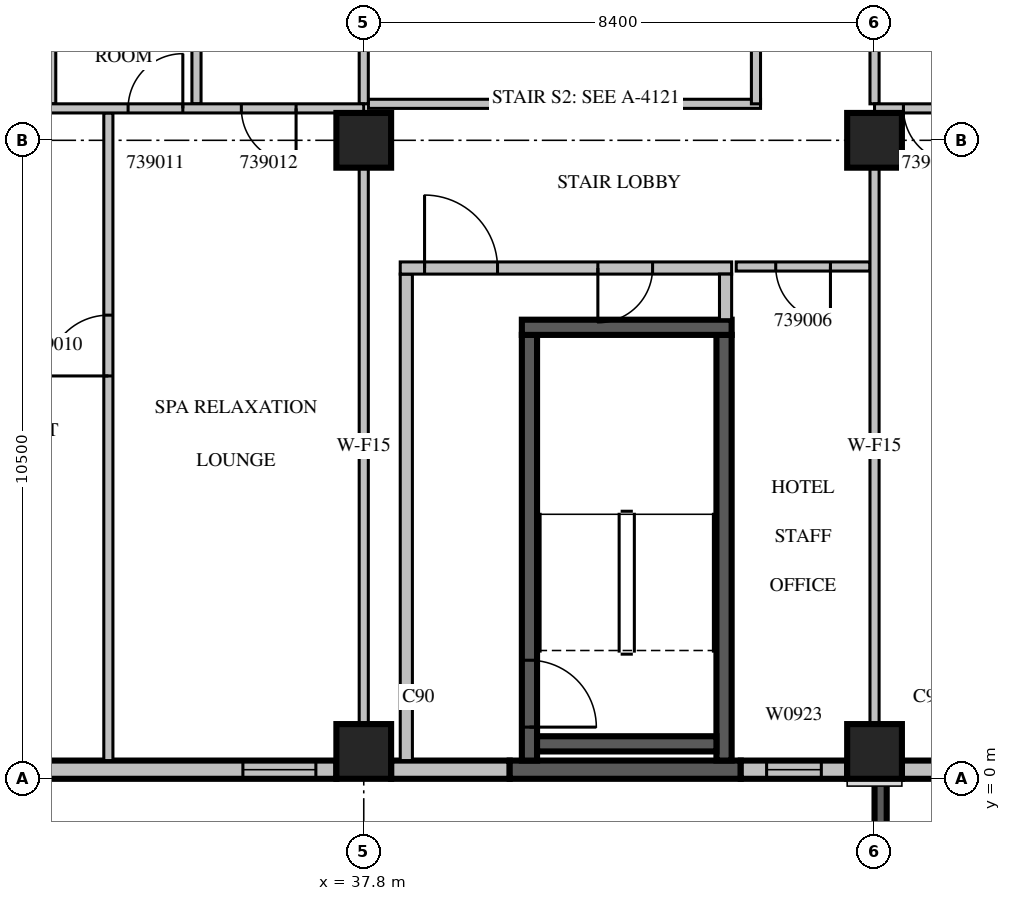
"""IFC4 building model, lengths in metres.
Left out: names, types, materials, properties, quantities, classifications, styles, units other than length and angle.
Written with IfcOpenShell. Run it as: python <this file> out.ifc"""

import sys

from ifc_helpers import new_model, si_unit, direction, frame, frame_2d, origin, origin_2d, place, context, subcontext, project, spatial, rectangle, extrude, source, transform, mapped, element, fill, save


model = new_model("IFC4")
c1 = context("Model", 3, precision=1e-05, world=origin(), true_north=direction((0.0, 1.0)))
c2 = subcontext(c1, "Body", "Model", "MODEL_VIEW")
j1 = project(units=[si_unit("LENGTHUNIT", "METRE"), si_unit("PLANEANGLEUNIT", "RADIAN")], contexts=[c1])
p1 = place(None, origin())
s1 = spatial("IfcSite", under=j1, at=p1, CompositionType="ELEMENT")
p2 = place(p1, origin())
s2 = spatial("IfcBuilding", under=s1, at=p2, CompositionType="ELEMENT")
p3 = place(p2, frame((0.0, 0.0, 181.6)))
s3 = spatial("IfcBuildingStorey", under=s2, at=p3, CompositionType="ELEMENT", Elevation=181.6)
m1 = source(origin(), c2, "Body", "SweptSolid", [
    extrude(rectangle(XDim=0.9, YDim=0.9, at=origin_2d()), origin(), (0.0, 0.0, 1.0), 3.8),
])
for number, where, z_axis, x_axis in (
    (1, (37.8, 0.45, 0.0), (0.0, 0.0, 1.0), (1.0, 0.0, 0.0)),
    (2, (46.2, 0.45, 0.0), (0.0, 0.0, 1.0), (1.0, 0.0, 0.0)),
    (3, (37.8, 10.5, 0.0), (0.0, 0.0, 1.0), (1.0, 0.0, 0.0)),
    (4, (46.2, 10.5, 0.0), (0.0, 0.0, 1.0), (1.0, 0.0, 0.0)),
):
    element("IfcColumn", number, at=place(p3, frame(where, z_axis=z_axis, x_axis=x_axis)), inside=s3, PredefinedType="COLUMN", context=c2, shape_type="MappedRepresentation", body=[
        mapped(m1, transform((0.0, 0.0, 0.0), scale=1.0)),
    ])
p4 = place(p3, frame((46.3, 0.0, 0.0), z_axis=(0.0, 0.0, 1.0), x_axis=(0.0, -1.0, 0.0)))
e5 = element("IfcWall", 5, at=p4, inside=s3, PredefinedType="SOLIDWALL", context=c2, shape_type="SweptSolid", body=[
    extrude(rectangle(XDim=3.9, YDim=0.2, at=frame_2d((1.95, 0.0))), origin(), (0.0, 0.0, 1.0), 3.4),
])
m2 = source(origin(), c2, "Body", "SweptSolid", [
    extrude(rectangle(XDim=2.4, YDim=2.3, at=frame_2d((1.2, 1.15))), frame((0.0, 0.11, 0.0), z_axis=(0.0, -1.0, 0.0), x_axis=(1.0, 0.0, 0.0)), (0.0, 0.0, 1.0), 0.22),
])
p5 = place(p4, frame((0.75, 0.0, 0.6)))
e6 = element("IfcOpeningElement", 6, at=p5, cuts=e5, PredefinedType="OPENING", context=c2, shape_type="MappedRepresentation", body=[
    mapped(m2, transform((0.0, 0.0, 0.0), scale=1.0)),
])
m3 = source(origin(), c2, "Body", "SweptSolid", [
    extrude(rectangle(XDim=7.5, YDim=0.3, at=frame_2d((3.75, 0.0))), origin(), (0.0, 0.0, 1.0), 3.4),
])
p6 = place(p3, frame((29.85, 0.15, 0.0), z_axis=(0.0, 0.0, 1.0), x_axis=(1.0, 0.0, 0.0)))
e7 = element("IfcWall", 7, at=p6, inside=s3, PredefinedType="STANDARD", context=c2, shape_type="MappedRepresentation", body=[
    mapped(m3, transform((0.0, 0.0, 0.0), scale=1.0)),
])
m4 = source(origin(), c2, "Body", "SweptSolid", [
    extrude(rectangle(XDim=1.2, YDim=2.3, at=frame_2d((0.6, 1.15))), frame((0.0, 0.16, 0.0), z_axis=(0.0, -1.0, 0.0), x_axis=(1.0, 0.0, 0.0)), (0.0, 0.0, 1.0), 0.32),
])
p7 = place(p6, frame((0.438, 0.0, 0.6)))
e8 = element("IfcOpeningElement", 8, at=p7, cuts=e7, PredefinedType="OPENING", context=c2, shape_type="MappedRepresentation", body=[
    mapped(m4, transform((0.0, 0.0, 0.0), scale=1.0)),
])
p8 = place(p6, frame((5.963, 0.0, 0.6)))
e9 = element("IfcOpeningElement", 9, at=p8, cuts=e7, PredefinedType="OPENING", context=c2, shape_type="MappedRepresentation", body=[
    mapped(m4, transform((0.0, 0.0, 0.0), scale=1.0)),
])
m5 = source(origin(), c2, "Body", "SweptSolid", [
    extrude(rectangle(XDim=1.95, YDim=0.3, at=frame_2d((0.975, 0.0))), origin(), (0.0, 0.0, 1.0), 3.4),
])
p9 = place(p3, frame((38.25, 0.15, 0.0), z_axis=(0.0, 0.0, 1.0), x_axis=(1.0, 0.0, 0.0)))
e10 = element("IfcWall", 10, at=p9, inside=s3, PredefinedType="STANDARD", context=c2, shape_type="MappedRepresentation", body=[
    mapped(m5, transform((0.0, 0.0, 0.0), scale=1.0)),
])
m6 = source(origin(), c2, "Body", "SweptSolid", [
    extrude(rectangle(XDim=3.8, YDim=0.3, at=frame_2d((1.9, 0.0))), origin(), (0.0, 0.0, 1.0), 3.4),
])
p10 = place(p3, frame((40.2, 0.15, 0.0), z_axis=(0.0, 0.0, 1.0), x_axis=(1.0, 0.0, 0.0)))
e11 = element("IfcWall", 11, at=p10, inside=s3, PredefinedType="SOLIDWALL", context=c2, shape_type="MappedRepresentation", body=[
    mapped(m6, transform((0.0, 0.0, 0.0), scale=1.0)),
])
m7 = source(origin(), c2, "Body", "SweptSolid", [
    extrude(rectangle(XDim=1.75, YDim=0.3, at=frame_2d((0.875, 0.0))), origin(), (0.0, 0.0, 1.0), 3.4),
])
p11 = place(p3, frame((44.0, 0.15, 0.0), z_axis=(0.0, 0.0, 1.0), x_axis=(1.0, 0.0, 0.0)))
e12 = element("IfcWall", 12, at=p11, inside=s3, PredefinedType="STANDARD", context=c2, shape_type="MappedRepresentation", body=[
    mapped(m7, transform((0.0, 0.0, 0.0), scale=1.0)),
])
m8 = source(origin(), c2, "Body", "SweptSolid", [
    extrude(rectangle(XDim=0.9, YDim=2.3, at=frame_2d((0.45, 1.15))), frame((0.0, 0.16, 0.0), z_axis=(0.0, -1.0, 0.0), x_axis=(1.0, 0.0, 0.0)), (0.0, 0.0, 1.0), 0.32),
])
p12 = place(p11, frame((0.425, 0.0, 0.6)))
e13 = element("IfcOpeningElement", 13, at=p12, cuts=e12, PredefinedType="OPENING", context=c2, shape_type="MappedRepresentation", body=[
    mapped(m8, transform((0.0, 0.0, 0.0), scale=1.0)),
])
m9 = source(origin(), c2, "Body", "SweptSolid", [
    extrude(rectangle(XDim=4.98, YDim=0.3, at=frame_2d((2.49, 0.0))), origin(), (0.0, 0.0, 1.0), 3.4),
])
p13 = place(p3, frame((46.65, 0.15, 0.0), z_axis=(0.0, 0.0, 1.0), x_axis=(1.0, 0.0, 0.0)))
e14 = element("IfcWall", 14, at=p13, inside=s3, PredefinedType="STANDARD", context=c2, shape_type="MappedRepresentation", body=[
    mapped(m9, transform((0.0, 0.0, 0.0), scale=1.0)),
])
m10 = source(origin(), c2, "Body", "SweptSolid", [
    extrude(rectangle(XDim=1.0, YDim=2.1, at=frame_2d((0.5, 1.05))), frame((0.0, 0.16, 0.0), z_axis=(0.0, -1.0, 0.0), x_axis=(1.0, 0.0, 0.0)), (0.0, 0.0, 1.0), 0.32),
])
p14 = place(p13, frame((1.99, 0.0, 0.0)))
e15 = element("IfcOpeningElement", 15, at=p14, cuts=e14, PredefinedType="OPENING", context=c2, shape_type="MappedRepresentation", body=[
    mapped(m10, transform((0.0, 0.0, 0.0), scale=1.0)),
])
m11 = source(origin(), c2, "Body", "SweptSolid", [
    extrude(rectangle(XDim=7.0, YDim=0.25, at=frame_2d((3.5, 0.0))), origin(), (0.0, 0.0, 1.0), 3.4),
])
p15 = place(p3, frame((40.525, 0.3, 0.0), z_axis=(0.0, 0.0, 1.0), x_axis=(0.0, 1.0, 0.0)))
e16 = element("IfcWall", 16, at=p15, inside=s3, PredefinedType="SOLIDWALL", context=c2, shape_type="MappedRepresentation", body=[
    mapped(m11, transform((0.0, 0.0, 0.0), scale=1.0)),
])
m12 = source(origin(), c2, "Body", "SweptSolid", [
    extrude(rectangle(XDim=1.1, YDim=2.1, at=frame_2d((0.55, 1.05))), frame((0.0, 0.135, 0.0), z_axis=(0.0, -1.0, 0.0), x_axis=(1.0, 0.0, 0.0)), (0.0, 0.0, 1.0), 0.27),
])
p16 = place(p15, frame((0.55, 0.0, 0.0)))
e17 = element("IfcOpeningElement", 17, at=p16, cuts=e16, PredefinedType="OPENING", context=c2, shape_type="MappedRepresentation", body=[
    mapped(m12, transform((0.0, 0.0, 0.0), scale=1.0)),
])
p17 = place(p3, frame((43.725, 0.3, 0.0), z_axis=(0.0, 0.0, 1.0), x_axis=(0.0, 1.0, 0.0)))
e18 = element("IfcWall", 18, at=p17, inside=s3, PredefinedType="SOLIDWALL", context=c2, shape_type="MappedRepresentation", body=[
    mapped(m11, transform((0.0, 0.0, 0.0), scale=1.0)),
])
m13 = source(origin(), c2, "Body", "SweptSolid", [
    extrude(rectangle(XDim=3.45, YDim=0.25, at=frame_2d((1.725, 0.0))), origin(), (0.0, 0.0, 1.0), 3.4),
])
p18 = place(p3, frame((40.4, 7.425, 0.0), z_axis=(0.0, 0.0, 1.0), x_axis=(1.0, 0.0, 0.0)))
e19 = element("IfcWall", 19, at=p18, inside=s3, PredefinedType="SOLIDWALL", context=c2, shape_type="MappedRepresentation", body=[
    mapped(m13, transform((0.0, 0.0, 0.0), scale=1.0)),
])
m14 = source(origin(), c2, "Body", "SweptSolid", [
    extrude(rectangle(XDim=2.95, YDim=0.25, at=frame_2d((1.475, 0.0))), origin(), (0.0, 0.0, 1.0), 3.4),
])
p19 = place(p3, frame((40.65, 0.575, 0.0), z_axis=(0.0, 0.0, 1.0), x_axis=(1.0, 0.0, 0.0)))
e20 = element("IfcWall", 20, at=p19, inside=s3, PredefinedType="SOLIDWALL", context=c2, shape_type="MappedRepresentation", body=[
    mapped(m14, transform((0.0, 0.0, 0.0), scale=1.0)),
])
m15 = source(origin(), c2, "Body", "SweptSolid", [
    extrude(rectangle(XDim=8.0, YDim=0.2, at=frame_2d((4.0, 0.0))), origin(), (0.0, 0.0, 1.0), 3.4),
])
p20 = place(p3, frame((38.5, 0.3, 0.0), z_axis=(0.0, 0.0, 1.0), x_axis=(0.0, 1.0, 0.0)))
e21 = element("IfcWall", 21, at=p20, inside=s3, PredefinedType="PARTITIONING", context=c2, shape_type="MappedRepresentation", body=[
    mapped(m15, transform((0.0, 0.0, 0.0), scale=1.0)),
])
m16 = source(origin(), c2, "Body", "SweptSolid", [
    extrude(rectangle(XDim=5.45, YDim=0.2, at=frame_2d((2.725, 0.0))), origin(), (0.0, 0.0, 1.0), 3.4),
])
p21 = place(p3, frame((38.4, 8.4, 0.0), z_axis=(0.0, 0.0, 1.0), x_axis=(1.0, 0.0, 0.0)))
e22 = element("IfcWall", 22, at=p21, inside=s3, PredefinedType="PARTITIONING", context=c2, shape_type="MappedRepresentation", body=[
    mapped(m16, transform((0.0, 0.0, 0.0), scale=1.0)),
])
m17 = source(origin(), c2, "Body", "SweptSolid", [
    extrude(rectangle(XDim=1.2, YDim=2.1, at=frame_2d((0.6, 1.05))), frame((0.0, 0.11, 0.0), z_axis=(0.0, -1.0, 0.0), x_axis=(1.0, 0.0, 0.0)), (0.0, 0.0, 1.0), 0.22),
])
p22 = place(p21, frame((0.4, 0.0, 0.0)))
e23 = element("IfcOpeningElement", 23, at=p22, cuts=e22, PredefinedType="OPENING", context=c2, shape_type="MappedRepresentation", body=[
    mapped(m17, transform((0.0, 0.0, 0.0), scale=1.0)),
])
m18 = source(origin(), c2, "Body", "SweptSolid", [
    extrude(rectangle(XDim=0.9, YDim=2.1, at=frame_2d((0.45, 1.05))), frame((0.0, 0.11, 0.0), z_axis=(0.0, -1.0, 0.0), x_axis=(1.0, 0.0, 0.0)), (0.0, 0.0, 1.0), 0.22),
])
p23 = place(p21, frame((3.25, 0.0, 0.0)))
e24 = element("IfcOpeningElement", 24, at=p23, cuts=e22, PredefinedType="OPENING", context=c2, shape_type="MappedRepresentation", body=[
    mapped(m18, transform((0.0, 0.0, 0.0), scale=1.0)),
])
m19 = source(origin(), c2, "Body", "SweptSolid", [
    extrude(rectangle(XDim=0.75, YDim=0.2, at=frame_2d((0.375, 0.0))), origin(), (0.0, 0.0, 1.0), 3.4),
])
p24 = place(p3, frame((43.75, 7.55, 0.0), z_axis=(0.0, 0.0, 1.0), x_axis=(0.0, 1.0, 0.0)))
e25 = element("IfcWall", 25, at=p24, inside=s3, PredefinedType="PARTITIONING", context=c2, shape_type="MappedRepresentation", body=[
    mapped(m19, transform((0.0, 0.0, 0.0), scale=1.0)),
])
m20 = source(origin(), c2, "Body", "SweptSolid", [
    extrude(rectangle(XDim=6.45, YDim=0.15, at=frame_2d((3.225, 0.0))), origin(), (0.0, 0.0, 1.0), 3.4),
])
p25 = place(p3, frame((37.875, 11.1, 0.0), z_axis=(0.0, 0.0, 1.0), x_axis=(1.0, 0.0, 0.0)))
e26 = element("IfcWall", 26, at=p25, inside=s3, PredefinedType="PARTITIONING", context=c2, shape_type="MappedRepresentation", body=[
    mapped(m20, transform((0.0, 0.0, 0.0), scale=1.0)),
])
m21 = source(origin(), c2, "Body", "SweptSolid", [
    extrude(rectangle(XDim=3.975, YDim=0.15, at=frame_2d((1.988, 0.0))), origin(), (0.0, 0.0, 1.0), 3.4),
])
p26 = place(p3, frame((44.25, 11.1, 0.0), z_axis=(0.0, 0.0, 1.0), x_axis=(0.0, 1.0, 0.0)))
e27 = element("IfcWall", 27, at=p26, inside=s3, PredefinedType="PARTITIONING", context=c2, shape_type="MappedRepresentation", body=[
    mapped(m21, transform((0.0, 0.0, 0.0), scale=1.0)),
])
m22 = source(origin(), c2, "Body", "SweptSolid", [
    extrude(rectangle(XDim=2.2, YDim=0.15, at=frame_2d((1.1, 0.0))), origin(), (0.0, 0.0, 1.0), 3.4),
])
p27 = place(p3, frame((46.125, 8.425, 0.0), z_axis=(0.0, 0.0, 1.0), x_axis=(-1.0, 0.0, 0.0)))
e28 = element("IfcWall", 28, at=p27, inside=s3, PredefinedType="PARTITIONING", context=c2, shape_type="MappedRepresentation", body=[
    mapped(m22, transform((0.0, 0.0, 0.0), scale=1.0)),
])
m23 = source(origin(), c2, "Body", "SweptSolid", [
    extrude(rectangle(XDim=0.9, YDim=2.1, at=frame_2d((0.45, 1.05))), frame((0.0, 0.085, 0.0), z_axis=(0.0, -1.0, 0.0), x_axis=(1.0, 0.0, 0.0)), (0.0, 0.0, 1.0), 0.17),
])
p28 = place(p27, frame((0.65, 0.0, 0.0)))
e29 = element("IfcOpeningElement", 29, at=p28, cuts=e28, PredefinedType="OPENING", context=c2, shape_type="MappedRepresentation", body=[
    mapped(m23, transform((0.0, 0.0, 0.0), scale=1.0)),
])
m24 = source(origin(), c2, "Body", "SweptSolid", [
    extrude(rectangle(XDim=10.65, YDim=0.15, at=frame_2d((5.325, 0.0))), origin(), (0.0, 0.0, 1.0), 3.4),
])
p29 = place(p3, frame((33.6, 0.3, 0.0), z_axis=(0.0, 0.0, 1.0), x_axis=(0.0, 1.0, 0.0)))
e30 = element("IfcWall", 30, at=p29, inside=s3, PredefinedType="PARTITIONING", context=c2, shape_type="MappedRepresentation", body=[
    mapped(m24, transform((0.0, 0.0, 0.0), scale=1.0)),
])
m25 = source(origin(), c2, "Body", "SweptSolid", [
    extrude(rectangle(XDim=1.0, YDim=2.1, at=frame_2d((0.5, 1.05))), frame((0.0, 0.085, 0.0), z_axis=(0.0, -1.0, 0.0), x_axis=(1.0, 0.0, 0.0)), (0.0, 0.0, 1.0), 0.17),
])
p30 = place(p29, frame((6.325, 0.0, 0.0)))
e31 = element("IfcOpeningElement", 31, at=p30, cuts=e30, PredefinedType="OPENING", context=c2, shape_type="MappedRepresentation", body=[
    mapped(m25, transform((0.0, 0.0, 0.0), scale=1.0)),
])
m26 = source(origin(), c2, "Body", "SweptSolid", [
    extrude(rectangle(XDim=3.9, YDim=0.15, at=frame_2d((1.95, 0.0))), origin(), (0.0, 0.0, 1.0), 3.4),
])
for number, where, z_axis, x_axis in (
    (32, (32.66, 11.1, 0.0), (0.0, 0.0, 1.0), (0.0, 1.0, 0.0)),
    (33, (35.049, 11.1, 0.0), (0.0, 0.0, 1.0), (0.0, 1.0, 0.0)),
):
    element("IfcWall", number, at=place(p3, frame(where, z_axis=z_axis, x_axis=x_axis)), inside=s3, PredefinedType="PARTITIONING", context=c2, shape_type="MappedRepresentation", body=[
        mapped(m26, transform((0.0, 0.0, 0.0), scale=1.0)),
    ])
m27 = source(origin(), c2, "Body", "SweptSolid", [
    extrude(rectangle(XDim=9.152, YDim=0.15, at=frame_2d((4.576, 0.0))), origin(), (0.0, 0.0, 1.0), 3.4),
])
p31 = place(p3, frame((37.8, 0.899, 0.0), z_axis=(0.0, 0.0, 1.0), x_axis=(0.0, 1.0, 0.0)))
e34 = element("IfcWall", 34, at=p31, inside=s3, PredefinedType="PARTITIONING", context=c2, shape_type="MappedRepresentation", body=[
    mapped(m27, transform((0.0, 0.0, 0.0), scale=1.0)),
])
p32 = place(p3, frame((37.8, 11.1, 0.0), z_axis=(0.0, 0.0, 1.0), x_axis=(0.0, 1.0, 0.0)))
e35 = element("IfcWall", 35, at=p32, inside=s3, PredefinedType="PARTITIONING", context=c2, shape_type="MappedRepresentation", body=[
    mapped(m26, transform((0.0, 0.0, 0.0), scale=1.0)),
])
m28 = source(origin(), c2, "Body", "SweptSolid", [
    extrude(rectangle(XDim=8.4, YDim=0.15, at=frame_2d((4.2, 0.0))), origin(), (0.0, 0.0, 1.0), 3.4),
])
p33 = place(p3, frame((37.8, 11.025, 0.0), z_axis=(0.0, 0.0, 1.0), x_axis=(-1.0, 0.0, 0.0)))
e36 = element("IfcWall", 36, at=p33, inside=s3, PredefinedType="PARTITIONING", context=c2, shape_type="MappedRepresentation", body=[
    mapped(m28, transform((0.0, 0.0, 0.0), scale=1.0)),
])
p34 = place(p33, frame((6.082, 0.0, 0.0)))
e37 = element("IfcOpeningElement", 37, at=p34, cuts=e36, PredefinedType="OPENING", context=c2, shape_type="MappedRepresentation", body=[
    mapped(m23, transform((0.0, 0.0, 0.0), scale=1.0)),
])
p35 = place(p33, frame((7.04, 0.0, 0.0)))
e38 = element("IfcOpeningElement", 38, at=p35, cuts=e36, PredefinedType="OPENING", context=c2, shape_type="MappedRepresentation", body=[
    mapped(m23, transform((0.0, 0.0, 0.0), scale=1.0)),
])
p36 = place(p33, frame((2.975, 0.0, 0.0)))
e39 = element("IfcOpeningElement", 39, at=p36, cuts=e36, PredefinedType="OPENING", context=c2, shape_type="MappedRepresentation", body=[
    mapped(m23, transform((0.0, 0.0, 0.0), scale=1.0)),
])
p37 = place(p33, frame((1.113, 0.0, 0.0)))
e40 = element("IfcOpeningElement", 40, at=p37, cuts=e36, PredefinedType="OPENING", context=c2, shape_type="MappedRepresentation", body=[
    mapped(m23, transform((0.0, 0.0, 0.0), scale=1.0)),
])
p38 = place(p3, frame((46.2, 0.899, 0.0), z_axis=(0.0, 0.0, 1.0), x_axis=(0.0, 1.0, 0.0)))
e41 = element("IfcWall", 41, at=p38, inside=s3, PredefinedType="PARTITIONING", context=c2, shape_type="MappedRepresentation", body=[
    mapped(m27, transform((0.0, 0.0, 0.0), scale=1.0)),
])
p39 = place(p3, frame((46.2, 11.1, 0.0), z_axis=(0.0, 0.0, 1.0), x_axis=(0.0, 1.0, 0.0)))
e42 = element("IfcWall", 42, at=p39, inside=s3, PredefinedType="PARTITIONING", context=c2, shape_type="MappedRepresentation", body=[
    mapped(m26, transform((0.0, 0.0, 0.0), scale=1.0)),
])
m29 = source(origin(), c2, "Body", "SweptSolid", [
    extrude(rectangle(XDim=13.14, YDim=0.15, at=frame_2d((6.57, 0.0))), origin(), (0.0, 0.0, 1.0), 3.4),
])
p40 = place(p3, frame((59.34, 11.025, 0.0), z_axis=(0.0, 0.0, 1.0), x_axis=(-1.0, 0.0, 0.0)))
e43 = element("IfcWall", 43, at=p40, inside=s3, PredefinedType="PARTITIONING", context=c2, shape_type="MappedRepresentation", body=[
    mapped(m29, transform((0.0, 0.0, 0.0), scale=1.0)),
])
p41 = place(p40, frame((11.765, 0.0, 0.0)))
e44 = element("IfcOpeningElement", 44, at=p41, cuts=e43, PredefinedType="OPENING", context=c2, shape_type="MappedRepresentation", body=[
    mapped(m23, transform((0.0, 0.0, 0.0), scale=1.0)),
])
p42 = place(p40, frame((9.637, 0.0, 0.0)))
e45 = element("IfcOpeningElement", 45, at=p42, cuts=e43, PredefinedType="OPENING", context=c2, shape_type="MappedRepresentation", body=[
    mapped(m23, transform((0.0, 0.0, 0.0), scale=1.0)),
])
p43 = place(p40, frame((5.12, 0.0, 0.0)))
e46 = element("IfcOpeningElement", 46, at=p43, cuts=e43, PredefinedType="OPENING", context=c2, shape_type="MappedRepresentation", body=[
    mapped(m23, transform((0.0, 0.0, 0.0), scale=1.0)),
])
m30 = source(origin(), c2, "Body", "SweptSolid", [
    extrude(rectangle(XDim=1.2, YDim=2.3, at=frame_2d((0.6, 1.15))), frame((0.0, 0.03, 0.0), z_axis=(0.0, -1.0, 0.0), x_axis=(1.0, 0.0, 0.0)), (0.0, 0.0, 1.0), 0.06),
])
p44 = place(p8, origin())
e47 = element("IfcWindow", 47, at=p44, inside=s3, PartitioningType="SINGLE_PANEL", PredefinedType="WINDOW", context=c2, shape_type="MappedRepresentation", body=[
    mapped(m30, transform((0.0, 0.0, 0.0), scale=1.0)),
])
fill(e9, e47)
m31 = source(origin(), c2, "Body", "SweptSolid", [
    extrude(rectangle(XDim=0.9, YDim=2.3, at=frame_2d((0.45, 1.15))), frame((0.0, 0.03, 0.0), z_axis=(0.0, -1.0, 0.0), x_axis=(1.0, 0.0, 0.0)), (0.0, 0.0, 1.0), 0.06),
])
p45 = place(p12, origin())
e48 = element("IfcWindow", 48, at=p45, inside=s3, PartitioningType="SINGLE_PANEL", PredefinedType="WINDOW", context=c2, shape_type="MappedRepresentation", body=[
    mapped(m31, transform((0.0, 0.0, 0.0), scale=1.0)),
])
fill(e13, e48)
m32 = source(origin(), c2, "Body", "SweptSolid", [
    extrude(rectangle(XDim=1.1, YDim=2.1, at=frame_2d((0.55, 1.05))), frame((0.0, 0.025, 0.0), z_axis=(0.0, -1.0, 0.0), x_axis=(1.0, 0.0, 0.0)), (0.0, 0.0, 1.0), 0.05),
])
p46 = place(p16, origin())
e49 = element("IfcDoor", 49, at=p46, inside=s3, OperationType="SINGLE_SWING_RIGHT", PredefinedType="DOOR", context=c2, shape_type="MappedRepresentation", body=[
    mapped(m32, transform((0.0, 0.0, 0.0), scale=1.0)),
])
fill(e17, e49)
m33 = source(origin(), c2, "Body", "SweptSolid", [
    extrude(rectangle(XDim=1.2, YDim=2.1, at=frame_2d((0.6, 1.05))), frame((0.0, 0.025, 0.0), z_axis=(0.0, -1.0, 0.0), x_axis=(1.0, 0.0, 0.0)), (0.0, 0.0, 1.0), 0.05),
])
p47 = place(p22, origin())
e50 = element("IfcDoor", 50, at=p47, inside=s3, OperationType="SINGLE_SWING_LEFT", PredefinedType="DOOR", context=c2, shape_type="MappedRepresentation", body=[
    mapped(m33, transform((0.0, 0.0, 0.0), scale=1.0)),
])
fill(e23, e50)
m34 = source(origin(), c2, "Body", "SweptSolid", [
    extrude(rectangle(XDim=0.9, YDim=2.1, at=frame_2d((0.45, 1.05))), frame((0.0, 0.025, 0.0), z_axis=(0.0, -1.0, 0.0), x_axis=(1.0, 0.0, 0.0)), (0.0, 0.0, 1.0), 0.05),
])
p48 = place(p23, origin())
e51 = element("IfcDoor", 51, at=p48, inside=s3, OperationType="SINGLE_SWING_RIGHT", PredefinedType="DOOR", context=c2, shape_type="MappedRepresentation", body=[
    mapped(m34, transform((0.0, 0.0, 0.0), scale=1.0)),
])
fill(e24, e51)
p49 = place(p28, origin())
e52 = element("IfcDoor", 52, at=p49, inside=s3, OperationType="SINGLE_SWING_LEFT", PredefinedType="DOOR", context=c2, shape_type="MappedRepresentation", body=[
    mapped(m34, transform((0.0, 0.0, 0.0), scale=1.0)),
])
fill(e29, e52)
m35 = source(origin(), c2, "Body", "SweptSolid", [
    extrude(rectangle(XDim=1.0, YDim=2.1, at=frame_2d((0.5, 1.05))), frame((0.0, 0.025, 0.0), z_axis=(0.0, -1.0, 0.0), x_axis=(1.0, 0.0, 0.0)), (0.0, 0.0, 1.0), 0.05),
])
p50 = place(p30, origin())
e53 = element("IfcDoor", 53, at=p50, inside=s3, OperationType="SINGLE_SWING_LEFT", PredefinedType="DOOR", context=c2, shape_type="MappedRepresentation", body=[
    mapped(m35, transform((0.0, 0.0, 0.0), scale=1.0)),
])
fill(e31, e53)
p51 = place(p36, origin())
e54 = element("IfcDoor", 54, at=p51, inside=s3, OperationType="SINGLE_SWING_RIGHT", PredefinedType="DOOR", context=c2, shape_type="MappedRepresentation", body=[
    mapped(m34, transform((0.0, 0.0, 0.0), scale=1.0)),
])
fill(e39, e54)
p52 = place(p37, origin())
e55 = element("IfcDoor", 55, at=p52, inside=s3, OperationType="SINGLE_SWING_LEFT", PredefinedType="DOOR", context=c2, shape_type="MappedRepresentation", body=[
    mapped(m34, transform((0.0, 0.0, 0.0), scale=1.0)),
])
fill(e40, e55)
p53 = place(p41, origin())
e56 = element("IfcDoor", 56, at=p53, inside=s3, OperationType="SINGLE_SWING_LEFT", PredefinedType="DOOR", context=c2, shape_type="MappedRepresentation", body=[
    mapped(m34, transform((0.0, 0.0, 0.0), scale=1.0)),
])
fill(e44, e56)
save(model, sys.argv[1])
